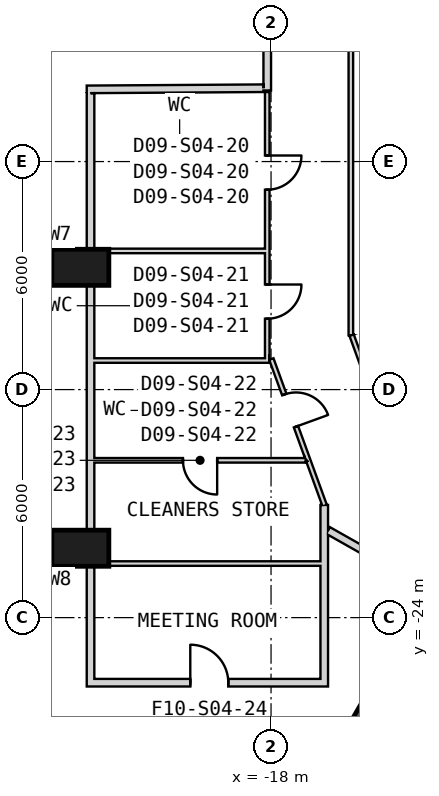
"""IFC4 building model, lengths in metres.
Left out: names, types, materials, properties, quantities, classifications, styles, units other than length and angle.
Written with IfcOpenShell. Run it as: python <this file> out.ifc"""

import sys

from ifc_helpers import new_model, si_unit, direction, frame, frame_2d, origin, origin_2d, place, context, subcontext, project, spatial, rectangle, extrude, element, fill, save


model = new_model("IFC4")
c1 = context("Model", 3, precision=1e-05, world=origin(), true_north=direction((0.0, 1.0)))
c2 = subcontext(c1, "Body", "Model", "MODEL_VIEW")
j1 = project(units=[si_unit("LENGTHUNIT", "METRE"), si_unit("PLANEANGLEUNIT", "RADIAN")], contexts=[c1])
p1 = place(None, origin())
s1 = spatial("IfcSite", under=j1, at=p1, CompositionType="ELEMENT")
p2 = place(p1, origin())
s2 = spatial("IfcBuilding", under=s1, at=p2, CompositionType="ELEMENT")
p3 = place(p2, frame((0.0, 0.0, 94.7)))
s3 = spatial("IfcBuildingStorey", under=s2, at=p3, CompositionType="ELEMENT", Elevation=94.7)
for number, where, z_axis, x_axis in (
    (1, (-23.018, -14.783, 0.0), (0.0, 0.0, 1.0), (-1.0, 0.0, 0.0)),
    (2, (-23.018, -22.174, 0.0), (0.0, 0.0, 1.0), (-1.0, 0.0, 0.0)),
):
    element("IfcColumn", number, at=place(p3, frame(where, z_axis=z_axis, x_axis=x_axis)), inside=s3, PredefinedType="COLUMN", context=c2, shape_type="SweptSolid", body=[
        extrude(rectangle(XDim=1.5, YDim=0.95, at=origin_2d()), origin(), (0.0, 0.0, 1.0), 4.1),
    ])
p4 = place(p3, frame((-10.575, -18.316, 0.0), z_axis=(0.0, 0.0, 1.0), x_axis=(-0.500006018292, -0.866021929094, 0.0)))
e3 = element("IfcWall", 3, at=p4, inside=s3, PredefinedType="SHEAR", context=c2, shape_type="SweptSolid", body=[
    extrude(rectangle(XDim=13.241, YDim=0.8, at=frame_2d((6.621, 0.0))), origin(), (0.0, 0.0, 1.0), 4.1),
])
p5 = place(p4, frame((6.35, 0.0, 0.0)))
e4 = element("IfcOpeningElement", 4, at=p5, cuts=e3, PredefinedType="OPENING", context=c2, shape_type="SweptSolid", body=[
    extrude(rectangle(XDim=1.4, YDim=2.4, at=frame_2d((0.7, 1.2))), frame((0.0, 0.41, 0.0), z_axis=(0.0, -1.0, 0.0), x_axis=(1.0, 0.0, 0.0)), (0.0, 0.0, 1.0), 0.82),
])
p6 = place(p3, frame((-15.9, 16.451, 0.0), z_axis=(0.0, 0.0, 1.0), x_axis=(0.0, -1.0, 0.0)))
e5 = element("IfcWall", 5, at=p6, inside=s3, PredefinedType="PARTITIONING", context=c2, shape_type="SweptSolid", body=[
    extrude(rectangle(XDim=33.022, YDim=0.12, at=frame_2d((16.511, 0.0))), origin(), (0.0, 0.0, 1.0), 2.98),
])
p7 = place(p6, frame((15.981, 0.0, 0.0)))
e6 = element("IfcOpeningElement", 6, at=p7, cuts=e5, PredefinedType="OPENING", context=c2, shape_type="SweptSolid", body=[
    extrude(rectangle(XDim=1.0, YDim=2.1, at=frame_2d((0.5, 1.05))), frame((0.0, 0.07, 0.0), z_axis=(0.0, -1.0, 0.0), x_axis=(1.0, 0.0, 0.0)), (0.0, 0.0, 1.0), 0.14),
])
p8 = place(p3, frame((-15.879, -16.567, 0.0), z_axis=(0.0, 0.0, 1.0), x_axis=(0.341999322503, -0.939700198685, 0.0)))
e7 = element("IfcWall", 7, at=p8, inside=s3, PredefinedType="PARTITIONING", context=c2, shape_type="SweptSolid", body=[
    extrude(rectangle(XDim=4.054, YDim=0.12, at=frame_2d((2.027, 0.0))), origin(), (0.0, 0.0, 1.0), 2.88),
])
p9 = place(p3, frame((-18.1, 10.13, 0.0), z_axis=(0.0, 0.0, 1.0), x_axis=(0.0, -1.0, 0.0)))
e8 = element("IfcWall", 8, at=p9, inside=s3, PredefinedType="PARTITIONING", context=c2, shape_type="SweptSolid", body=[
    extrude(rectangle(XDim=20.26, YDim=0.2, at=frame_2d((10.13, 0.0))), origin(), (0.0, 0.0, 1.0), 3.08),
])
p10 = place(p9, frame((9.63, 0.0, 0.0)))
e9 = element("IfcOpeningElement", 9, at=p10, cuts=e8, PredefinedType="OPENING", context=c2, shape_type="SweptSolid", body=[
    extrude(rectangle(XDim=1.0, YDim=2.1, at=frame_2d((0.5, 1.05))), frame((0.0, 0.11, 0.0), z_axis=(0.0, -1.0, 0.0), x_axis=(1.0, 0.0, 0.0)), (0.0, 0.0, 1.0), 0.22),
])
p11 = place(p3, frame((-16.5, -21.706, 0.0), z_axis=(0.0, 0.0, 1.0), x_axis=(0.870637705421, -0.491924776668, 0.0)))
e10 = element("IfcWall", 10, at=p11, inside=s3, PredefinedType="PARTITIONING", context=c2, shape_type="SweptSolid", body=[
    extrude(rectangle(XDim=3.036, YDim=0.2, at=frame_2d((1.518, 0.0))), origin(), (0.0, 0.0, 1.0), 3.8),
])
p12 = place(p3, frame((-18.1, -10.17, 0.0), z_axis=(0.0, 0.0, 1.0), x_axis=(0.0, -1.0, 0.0)))
e11 = element("IfcWall", 11, at=p12, inside=s3, PredefinedType="PARTITIONING", context=c2, shape_type="SweptSolid", body=[
    extrude(rectangle(XDim=7.005, YDim=0.12, at=frame_2d((3.503, 0.0))), origin(), (0.0, 0.0, 1.0), 3.08),
])
p13 = place(p12, frame((1.671, 0.0, 0.0)))
e12 = element("IfcOpeningElement", 12, at=p13, cuts=e11, PredefinedType="OPENING", context=c2, shape_type="SweptSolid", body=[
    extrude(rectangle(XDim=0.9, YDim=2.1, at=frame_2d((0.45, 1.05))), frame((0.0, 0.07, 0.0), z_axis=(0.0, -1.0, 0.0), x_axis=(1.0, 0.0, 0.0)), (0.0, 0.0, 1.0), 0.14),
])
p14 = place(p12, frame((5.065, 0.0, 0.0)))
e13 = element("IfcOpeningElement", 13, at=p14, cuts=e11, PredefinedType="OPENING", context=c2, shape_type="SweptSolid", body=[
    extrude(rectangle(XDim=0.9, YDim=2.1, at=frame_2d((0.45, 1.05))), frame((0.0, 0.07, 0.0), z_axis=(0.0, -1.0, 0.0), x_axis=(1.0, 0.0, 0.0)), (0.0, 0.0, 1.0), 0.14),
])
p15 = place(p3, frame((-17.992, -17.196, 0.0), z_axis=(0.0, 0.0, 1.0), x_axis=(0.341997880797, -0.939700723385, 0.0)))
e14 = element("IfcWall", 14, at=p15, inside=s3, PredefinedType="PARTITIONING", context=c2, shape_type="SweptSolid", body=[
    extrude(rectangle(XDim=2.846, YDim=0.12, at=frame_2d((1.423, 0.0))), origin(), (0.0, 0.0, 1.0), 2.98),
])
p16 = place(p15, frame((0.994, 0.0, 0.0)))
e15 = element("IfcOpeningElement", 15, at=p16, cuts=e14, PredefinedType="OPENING", context=c2, shape_type="SweptSolid", body=[
    extrude(rectangle(XDim=0.9, YDim=2.1, at=frame_2d((0.45, 1.05))), frame((0.0, 0.07, 0.0), z_axis=(0.0, -1.0, 0.0), x_axis=(1.0, 0.0, 0.0)), (0.0, 0.0, 1.0), 0.14),
])
p17 = place(p3, frame((-17.019, -19.87, 0.0), z_axis=(0.0, 0.0, 1.0), x_axis=(0.341976406316, -0.939708538603, 0.0)))
e16 = element("IfcWall", 16, at=p17, inside=s3, PredefinedType="PARTITIONING", context=c2, shape_type="SweptSolid", body=[
    extrude(rectangle(XDim=1.26, YDim=0.12, at=frame_2d((0.63, 0.0))), origin(), (0.0, 0.0, 1.0), 2.88),
])
p18 = place(p3, frame((-16.6, -25.613, 0.0), z_axis=(0.0, 0.0, 1.0), x_axis=(0.0, 1.0, 0.0)))
e17 = element("IfcWall", 17, at=p18, inside=s3, PredefinedType="PARTITIONING", context=c2, shape_type="SweptSolid", body=[
    extrude(rectangle(XDim=3.035, YDim=0.2, at=frame_2d((1.518, 0.0))), origin(), (0.0, 0.0, 1.0), 3.8),
])
p19 = place(p3, frame((-16.6, -22.577, 0.0), z_axis=(0.0, 0.0, 1.0), x_axis=(0.0, 1.0, 0.0)))
e18 = element("IfcWall", 18, at=p19, inside=s3, PredefinedType="PARTITIONING", context=c2, shape_type="SweptSolid", body=[
    extrude(rectangle(XDim=1.542, YDim=0.2, at=frame_2d((0.771, 0.0))), origin(), (0.0, 0.0, 1.0), 2.88),
])
p20 = place(p3, frame((-22.85, -10.101, 0.0), z_axis=(0.0, 0.0, 1.0), x_axis=(0.999979149644, 0.00645757523, 0.0)))
e19 = element("IfcWall", 19, at=p20, inside=s3, PredefinedType="PARTITIONING", context=c2, shape_type="SweptSolid", body=[
    extrude(rectangle(XDim=4.65, YDim=0.2, at=frame_2d((2.325, 0.0))), origin(), (0.0, 0.0, 1.0), 3.8),
])
p21 = place(p3, frame((-22.75, -25.812, 0.0), z_axis=(0.0, 0.0, 1.0), x_axis=(0.0, 1.0, 0.0)))
e20 = element("IfcWall", 20, at=p21, inside=s3, PredefinedType="PARTITIONING", context=c2, shape_type="SweptSolid", body=[
    extrude(rectangle(XDim=3.235, YDim=0.2, at=frame_2d((1.618, 0.0))), origin(), (0.0, 0.0, 1.0), 3.8),
])
p22 = place(p3, frame((-22.75, -22.577, 0.0), z_axis=(0.0, 0.0, 1.0), x_axis=(0.0, 1.0, 0.0)))
e21 = element("IfcWall", 21, at=p22, inside=s3, PredefinedType="PARTITIONING", context=c2, shape_type="SweptSolid", body=[
    extrude(rectangle(XDim=2.717, YDim=0.2, at=frame_2d((1.358, 0.0))), origin(), (0.0, 0.0, 1.0), 3.8),
])
p23 = place(p3, frame((-22.75, -17.235, 0.0), z_axis=(0.0, 0.0, 1.0), x_axis=(0.0, 1.0, 0.0)))
e22 = element("IfcWall", 22, at=p23, inside=s3, PredefinedType="PARTITIONING", context=c2, shape_type="SweptSolid", body=[
    extrude(rectangle(XDim=7.035, YDim=0.2, at=frame_2d((3.518, 0.0))), origin(), (0.0, 0.0, 1.0), 3.8),
])
p24 = place(p3, frame((-22.75, -19.861, 0.0), z_axis=(0.0, 0.0, 1.0), x_axis=(0.0, 1.0, 0.0)))
e23 = element("IfcWall", 23, at=p24, inside=s3, PredefinedType="PARTITIONING", context=c2, shape_type="SweptSolid", body=[
    extrude(rectangle(XDim=2.626, YDim=0.2, at=frame_2d((1.313, 0.0))), origin(), (0.0, 0.0, 1.0), 3.8),
])
p25 = place(p3, frame((-22.65, -25.712, 0.0), z_axis=(0.0, 0.0, 1.0), x_axis=(1.0, 0.0, 0.0)))
e24 = element("IfcWall", 24, at=p25, inside=s3, PredefinedType="PARTITIONING", context=c2, shape_type="SweptSolid", body=[
    extrude(rectangle(XDim=6.15, YDim=0.2, at=frame_2d((3.075, 0.0))), origin(), (0.0, 0.0, 1.0), 2.88),
])
p26 = place(p25, frame((2.525, 0.0, 0.0)))
e25 = element("IfcOpeningElement", 25, at=p26, cuts=e24, PredefinedType="OPENING", context=c2, shape_type="SweptSolid", body=[
    extrude(rectangle(XDim=1.0, YDim=2.1, at=frame_2d((0.5, 1.05))), frame((0.0, 0.11, 0.0), z_axis=(0.0, -1.0, 0.0), x_axis=(1.0, 0.0, 0.0)), (0.0, 0.0, 1.0), 0.22),
])
p27 = place(p3, frame((-22.65, -14.351, 0.0), z_axis=(0.0, 0.0, 1.0), x_axis=(1.0, 0.0, 0.0)))
e26 = element("IfcWall", 26, at=p27, inside=s3, PredefinedType="PARTITIONING", context=c2, shape_type="SweptSolid", body=[
    extrude(rectangle(XDim=4.49, YDim=0.12, at=frame_2d((2.245, 0.0))), origin(), (0.0, 0.0, 1.0), 3.08),
])
p28 = place(p3, frame((-18.042, -17.235, 0.0), z_axis=(0.0, 0.0, 1.0), x_axis=(-1.0, 0.0, 0.0)))
e27 = element("IfcWall", 27, at=p28, inside=s3, PredefinedType="PARTITIONING", context=c2, shape_type="SweptSolid", body=[
    extrude(rectangle(XDim=4.608, YDim=0.12, at=frame_2d((2.304, 0.0))), origin(), (0.0, 0.0, 1.0), 2.98),
])
p29 = place(p3, frame((-17.086, -19.861, 0.0), z_axis=(0.0, 0.0, 1.0), x_axis=(-1.0, 0.0, 0.0)))
e28 = element("IfcWall", 28, at=p29, inside=s3, PredefinedType="PARTITIONING", context=c2, shape_type="SweptSolid", body=[
    extrude(rectangle(XDim=5.564, YDim=0.12, at=frame_2d((2.782, 0.0))), origin(), (0.0, 0.0, 1.0), 2.98),
])
p30 = place(p29, frame((2.332, 0.0, 0.0)))
e29 = element("IfcOpeningElement", 29, at=p30, cuts=e28, PredefinedType="OPENING", context=c2, shape_type="SweptSolid", body=[
    extrude(rectangle(XDim=0.9, YDim=2.1, at=frame_2d((0.45, 1.05))), frame((0.0, 0.07, 0.0), z_axis=(0.0, -1.0, 0.0), x_axis=(1.0, 0.0, 0.0)), (0.0, 0.0, 1.0), 0.14),
])
p31 = place(p3, frame((-16.7, -22.577, 0.0), z_axis=(0.0, 0.0, 1.0), x_axis=(-1.0, 0.0, 0.0)))
e30 = element("IfcWall", 30, at=p31, inside=s3, PredefinedType="PARTITIONING", context=c2, shape_type="SweptSolid", body=[
    extrude(rectangle(XDim=5.95, YDim=0.12, at=frame_2d((2.975, 0.0))), origin(), (0.0, 0.0, 1.0), 2.88),
])
p32 = place(p13, origin())
e31 = element("IfcDoor", 31, at=p32, inside=s3, OperationType="SINGLE_SWING_LEFT", PredefinedType="NOTDEFINED", context=c2, shape_type="SweptSolid", body=[
    extrude(rectangle(XDim=0.9, YDim=2.1, at=frame_2d((0.45, 1.05))), frame((0.0, 0.025, 0.0), z_axis=(0.0, -1.0, 0.0), x_axis=(1.0, 0.0, 0.0)), (0.0, 0.0, 1.0), 0.05),
])
fill(e12, e31)
p33 = place(p14, origin())
e32 = element("IfcDoor", 32, at=p33, inside=s3, OperationType="SINGLE_SWING_RIGHT", PredefinedType="NOTDEFINED", context=c2, shape_type="SweptSolid", body=[
    extrude(rectangle(XDim=0.9, YDim=2.1, at=frame_2d((0.45, 1.05))), frame((0.0, 0.025, 0.0), z_axis=(0.0, -1.0, 0.0), x_axis=(1.0, 0.0, 0.0)), (0.0, 0.0, 1.0), 0.05),
])
fill(e13, e32)
p34 = place(p16, origin())
e33 = element("IfcDoor", 33, at=p34, inside=s3, OperationType="SINGLE_SWING_LEFT", PredefinedType="NOTDEFINED", context=c2, shape_type="SweptSolid", body=[
    extrude(rectangle(XDim=0.9, YDim=2.1, at=frame_2d((0.45, 1.05))), frame((0.0, 0.025, 0.0), z_axis=(0.0, -1.0, 0.0), x_axis=(1.0, 0.0, 0.0)), (0.0, 0.0, 1.0), 0.05),
])
fill(e15, e33)
p35 = place(p30, origin())
e34 = element("IfcDoor", 34, at=p35, inside=s3, OperationType="SINGLE_SWING_LEFT", PredefinedType="NOTDEFINED", context=c2, shape_type="SweptSolid", body=[
    extrude(rectangle(XDim=0.9, YDim=2.1, at=frame_2d((0.45, 1.05))), frame((0.0, 0.025, 0.0), z_axis=(0.0, -1.0, 0.0), x_axis=(1.0, 0.0, 0.0)), (0.0, 0.0, 1.0), 0.05),
])
fill(e29, e34)
p36 = place(p26, origin())
e35 = element("IfcDoor", 35, at=p36, inside=s3, OperationType="SINGLE_SWING_LEFT", PredefinedType="USERDEFINED", context=c2, shape_type="SweptSolid", body=[
    extrude(rectangle(XDim=1.0, YDim=2.1, at=frame_2d((0.5, 1.05))), frame((0.0, 0.025, 0.0), z_axis=(0.0, -1.0, 0.0), x_axis=(1.0, 0.0, 0.0)), (0.0, 0.0, 1.0), 0.05),
])
fill(e25, e35)
save(model, sys.argv[1])
